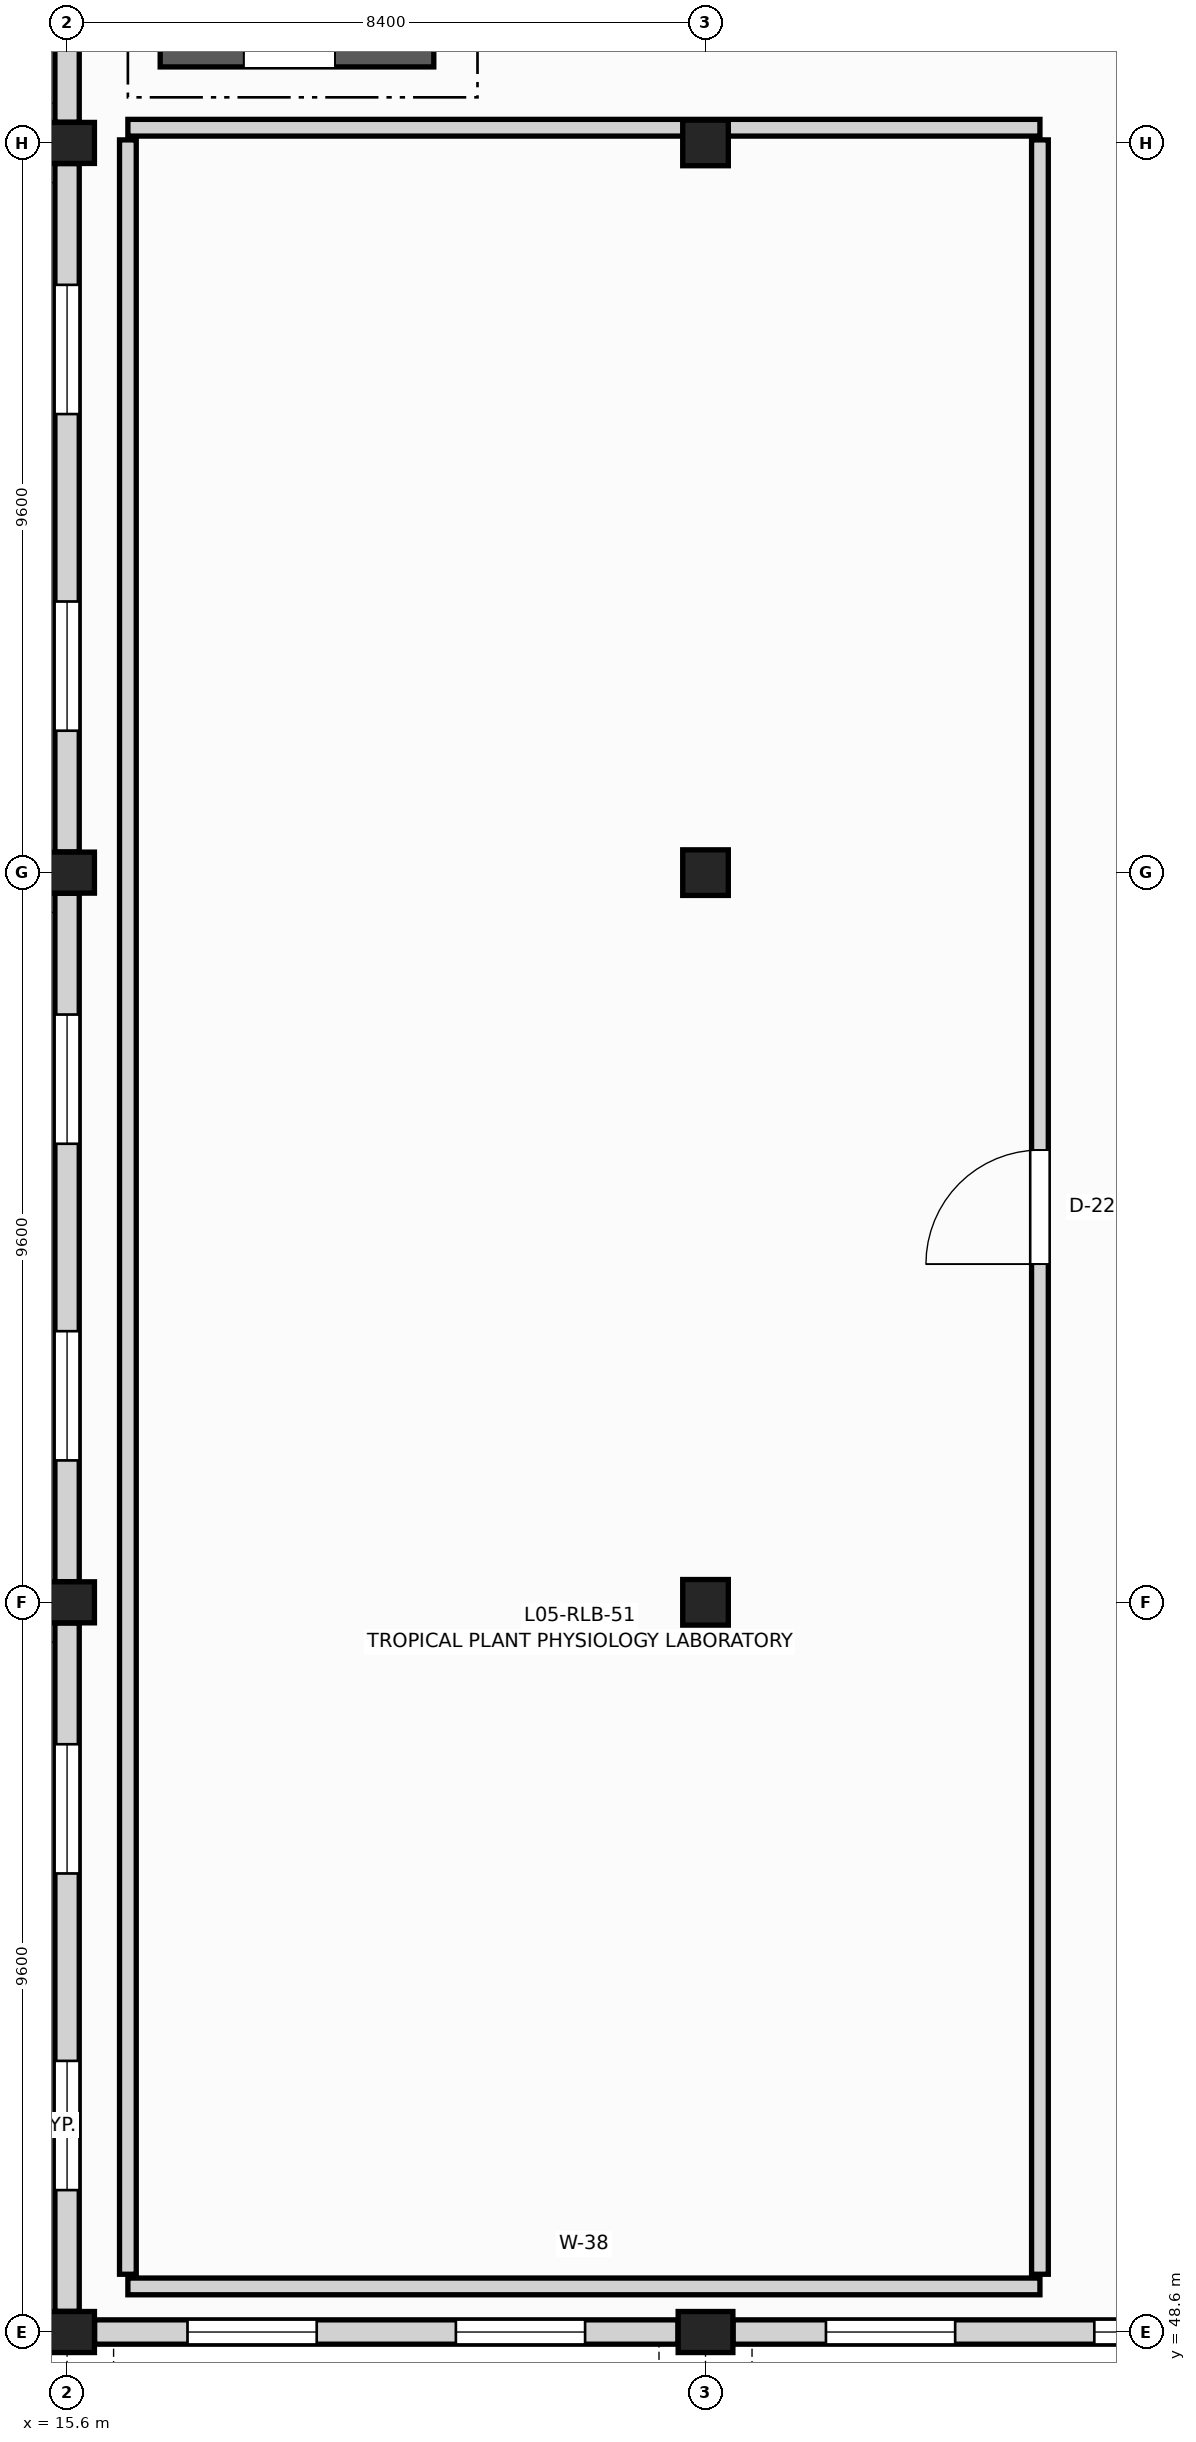
"""IFC4 building model, lengths in metres.
Left out: names, types, materials, properties, quantities, classifications, styles, units other than length and angle.
Written with IfcOpenShell. Run it as: python <this file> out.ifc"""

import sys

from ifc_helpers import new_model, si_unit, direction, frame, frame_2d, origin, origin_2d, place, context, subcontext, project, spatial, rectangle, extrude, element, fill, save


model = new_model("IFC4")
c1 = context("Model", 3, precision=1e-05, world=origin(), true_north=direction((0.0, 1.0)))
c2 = subcontext(c1, "Body", "Model", "MODEL_VIEW")
j1 = project(units=[si_unit("LENGTHUNIT", "METRE"), si_unit("PLANEANGLEUNIT", "RADIAN")], contexts=[c1])
p1 = place(None, origin())
s1 = spatial("IfcSite", under=j1, at=p1, CompositionType="ELEMENT")
p2 = place(p1, origin())
s2 = spatial("IfcBuilding", under=s1, at=p2, CompositionType="ELEMENT")
p3 = place(p2, frame((0.0, 0.0, 22.5)))
s3 = spatial("IfcBuildingStorey", under=s2, at=p3, CompositionType="ELEMENT", Elevation=22.5)
for number, where, z_axis, x_axis in (
    (1, (15.6, 48.6, 0.0), (0.0, 0.0, 1.0), (1.0, 0.0, 0.0)),
    (2, (15.6, 58.2, 0.0), (0.0, 0.0, 1.0), (1.0, 0.0, 0.0)),
    (3, (15.6, 67.8, 0.0), (0.0, 0.0, 1.0), (1.0, 0.0, 0.0)),
    (4, (15.6, 77.4, 0.0), (0.0, 0.0, 1.0), (1.0, 0.0, 0.0)),
    (5, (24.0, 48.6, 0.0), (0.0, 0.0, 1.0), (1.0, 0.0, 0.0)),
):
    element("IfcColumn", number, at=place(p3, frame(where, z_axis=z_axis, x_axis=x_axis)), inside=s3, PredefinedType="COLUMN", context=c2, shape_type="SweptSolid", body=[
        extrude(rectangle(XDim=0.72, YDim=0.54, at=origin_2d()), origin(), (0.0, 0.0, 1.0), 3.98),
    ])
for number, where, z_axis, x_axis in (
    (6, (24.0, 58.2, 0.0), (0.0, 0.0, 1.0), (1.0, 0.0, 0.0)),
    (7, (24.0, 67.8, 0.0), (0.0, 0.0, 1.0), (1.0, 0.0, 0.0)),
    (8, (24.0, 77.4, 0.0), (0.0, 0.0, 1.0), (1.0, 0.0, 0.0)),
):
    element("IfcColumn", number, at=place(p3, frame(where, z_axis=z_axis, x_axis=x_axis)), inside=s3, PredefinedType="COLUMN", context=c2, shape_type="SweptSolid", body=[
        extrude(rectangle(XDim=0.6, YDim=0.6, at=origin_2d()), origin(), (0.0, 0.0, 1.0), 3.98),
    ])
p4 = place(p3, frame((15.6, 48.872, 0.0), z_axis=(0.0, 0.0, 1.0), x_axis=(0.0, 1.0, 0.0)))
e9 = element("IfcWall", 9, at=p4, inside=s3, PredefinedType="SOLIDWALL", context=c2, shape_type="SweptSolid", body=[
    extrude(rectangle(XDim=9.056, YDim=0.32, at=frame_2d((4.528, 0.0))), origin(), (0.0, 0.0, 1.0), 3.08),
])
p5 = place(p4, frame((1.595, 0.0, 0.9)))
e10 = element("IfcOpeningElement", 10, at=p5, cuts=e9, PredefinedType="OPENING", context=c2, shape_type="SweptSolid", body=[
    extrude(rectangle(XDim=1.7, YDim=1.8, at=frame_2d((0.85, 0.9))), frame((0.0, 0.17, 0.0), z_axis=(0.0, -1.0, 0.0), x_axis=(1.0, 0.0, 0.0)), (0.0, 0.0, 1.0), 0.34),
])
p6 = place(p4, frame((5.761, 0.0, 0.9)))
e11 = element("IfcOpeningElement", 11, at=p6, cuts=e9, PredefinedType="OPENING", context=c2, shape_type="SweptSolid", body=[
    extrude(rectangle(XDim=1.7, YDim=1.8, at=frame_2d((0.85, 0.9))), frame((0.0, 0.17, 0.0), z_axis=(0.0, -1.0, 0.0), x_axis=(1.0, 0.0, 0.0)), (0.0, 0.0, 1.0), 0.34),
])
p7 = place(p3, frame((15.6, 58.472, 0.0), z_axis=(0.0, 0.0, 1.0), x_axis=(0.0, 1.0, 0.0)))
e12 = element("IfcWall", 12, at=p7, inside=s3, PredefinedType="SOLIDWALL", context=c2, shape_type="SweptSolid", body=[
    extrude(rectangle(XDim=9.056, YDim=0.32, at=frame_2d((4.528, 0.0))), origin(), (0.0, 0.0, 1.0), 3.08),
])
p8 = place(p7, frame((1.595, 0.0, 0.9)))
e13 = element("IfcOpeningElement", 13, at=p8, cuts=e12, PredefinedType="OPENING", context=c2, shape_type="SweptSolid", body=[
    extrude(rectangle(XDim=1.7, YDim=1.8, at=frame_2d((0.85, 0.9))), frame((0.0, 0.17, 0.0), z_axis=(0.0, -1.0, 0.0), x_axis=(1.0, 0.0, 0.0)), (0.0, 0.0, 1.0), 0.34),
])
p9 = place(p7, frame((5.761, 0.0, 0.9)))
e14 = element("IfcOpeningElement", 14, at=p9, cuts=e12, PredefinedType="OPENING", context=c2, shape_type="SweptSolid", body=[
    extrude(rectangle(XDim=1.7, YDim=1.8, at=frame_2d((0.85, 0.9))), frame((0.0, 0.17, 0.0), z_axis=(0.0, -1.0, 0.0), x_axis=(1.0, 0.0, 0.0)), (0.0, 0.0, 1.0), 0.34),
])
p10 = place(p3, frame((15.6, 68.072, 0.0), z_axis=(0.0, 0.0, 1.0), x_axis=(0.0, 1.0, 0.0)))
e15 = element("IfcWall", 15, at=p10, inside=s3, PredefinedType="SOLIDWALL", context=c2, shape_type="SweptSolid", body=[
    extrude(rectangle(XDim=9.056, YDim=0.32, at=frame_2d((4.528, 0.0))), origin(), (0.0, 0.0, 1.0), 3.08),
])
p11 = place(p10, frame((1.595, 0.0, 0.9)))
e16 = element("IfcOpeningElement", 16, at=p11, cuts=e15, PredefinedType="OPENING", context=c2, shape_type="SweptSolid", body=[
    extrude(rectangle(XDim=1.7, YDim=1.8, at=frame_2d((0.85, 0.9))), frame((0.0, 0.17, 0.0), z_axis=(0.0, -1.0, 0.0), x_axis=(1.0, 0.0, 0.0)), (0.0, 0.0, 1.0), 0.34),
])
p12 = place(p10, frame((5.761, 0.0, 0.9)))
e17 = element("IfcOpeningElement", 17, at=p12, cuts=e15, PredefinedType="OPENING", context=c2, shape_type="SweptSolid", body=[
    extrude(rectangle(XDim=1.7, YDim=1.8, at=frame_2d((0.85, 0.9))), frame((0.0, 0.17, 0.0), z_axis=(0.0, -1.0, 0.0), x_axis=(1.0, 0.0, 0.0)), (0.0, 0.0, 1.0), 0.34),
])
p13 = place(p3, frame((15.6, 77.672, 0.0), z_axis=(0.0, 0.0, 1.0), x_axis=(0.0, 1.0, 0.0)))
e18 = element("IfcWall", 18, at=p13, inside=s3, PredefinedType="SOLIDWALL", context=c2, shape_type="SweptSolid", body=[
    extrude(rectangle(XDim=8.976, YDim=0.32, at=frame_2d((4.488, 0.0))), origin(), (0.0, 0.0, 1.0), 3.08),
])
p14 = place(p13, frame((1.573, 0.0, 0.9)))
e19 = element("IfcOpeningElement", 19, at=p14, cuts=e18, PredefinedType="OPENING", context=c2, shape_type="SweptSolid", body=[
    extrude(rectangle(XDim=1.7, YDim=1.8, at=frame_2d((0.85, 0.9))), frame((0.0, 0.17, 0.0), z_axis=(0.0, -1.0, 0.0), x_axis=(1.0, 0.0, 0.0)), (0.0, 0.0, 1.0), 0.34),
])
p15 = place(p13, frame((5.702, 0.0, 0.9)))
e20 = element("IfcOpeningElement", 20, at=p15, cuts=e18, PredefinedType="OPENING", context=c2, shape_type="SweptSolid", body=[
    extrude(rectangle(XDim=1.7, YDim=1.8, at=frame_2d((0.85, 0.9))), frame((0.0, 0.17, 0.0), z_axis=(0.0, -1.0, 0.0), x_axis=(1.0, 0.0, 0.0)), (0.0, 0.0, 1.0), 0.34),
])
p16 = place(p3, frame((15.962, 48.6, 0.0), z_axis=(0.0, 0.0, 1.0), x_axis=(1.0, 0.0, 0.0)))
e21 = element("IfcWall", 21, at=p16, inside=s3, PredefinedType="SOLIDWALL", context=c2, shape_type="SweptSolid", body=[
    extrude(rectangle(XDim=7.676, YDim=0.32, at=frame_2d((3.838, 0.0))), origin(), (0.0, 0.0, 1.0), 3.08),
])
p17 = place(p16, frame((1.222, 0.0, 0.9)))
e22 = element("IfcOpeningElement", 22, at=p17, cuts=e21, PredefinedType="OPENING", context=c2, shape_type="SweptSolid", body=[
    extrude(rectangle(XDim=1.7, YDim=1.8, at=frame_2d((0.85, 0.9))), frame((0.0, 0.17, 0.0), z_axis=(0.0, -1.0, 0.0), x_axis=(1.0, 0.0, 0.0)), (0.0, 0.0, 1.0), 0.34),
])
p18 = place(p16, frame((4.753, 0.0, 0.9)))
e23 = element("IfcOpeningElement", 23, at=p18, cuts=e21, PredefinedType="OPENING", context=c2, shape_type="SweptSolid", body=[
    extrude(rectangle(XDim=1.7, YDim=1.8, at=frame_2d((0.85, 0.9))), frame((0.0, 0.17, 0.0), z_axis=(0.0, -1.0, 0.0), x_axis=(1.0, 0.0, 0.0)), (0.0, 0.0, 1.0), 0.34),
])
p19 = place(p3, frame((24.362, 48.6, 0.0), z_axis=(0.0, 0.0, 1.0), x_axis=(1.0, 0.0, 0.0)))
e24 = element("IfcWall", 24, at=p19, inside=s3, PredefinedType="SOLIDWALL", context=c2, shape_type="SweptSolid", body=[
    extrude(rectangle(XDim=7.676, YDim=0.32, at=frame_2d((3.838, 0.0))), origin(), (0.0, 0.0, 1.0), 3.08),
])
p20 = place(p19, frame((1.222, 0.0, 0.9)))
e25 = element("IfcOpeningElement", 25, at=p20, cuts=e24, PredefinedType="OPENING", context=c2, shape_type="SweptSolid", body=[
    extrude(rectangle(XDim=1.7, YDim=1.8, at=frame_2d((0.85, 0.9))), frame((0.0, 0.17, 0.0), z_axis=(0.0, -1.0, 0.0), x_axis=(1.0, 0.0, 0.0)), (0.0, 0.0, 1.0), 0.34),
])
p21 = place(p19, frame((4.753, 0.0, 0.9)))
e26 = element("IfcOpeningElement", 26, at=p21, cuts=e24, PredefinedType="OPENING", context=c2, shape_type="SweptSolid", body=[
    extrude(rectangle(XDim=1.7, YDim=1.8, at=frame_2d((0.85, 0.9))), frame((0.0, 0.17, 0.0), z_axis=(0.0, -1.0, 0.0), x_axis=(1.0, 0.0, 0.0)), (0.0, 0.0, 1.0), 0.34),
])
p22 = place(p3, frame((16.825, 78.575, 0.0), z_axis=(0.0, 0.0, 1.0), x_axis=(1.0, 0.0, 0.0)))
e27 = element("IfcWall", 27, at=p22, inside=s3, PredefinedType="SHEAR", context=c2, shape_type="SweptSolid", body=[
    extrude(rectangle(XDim=3.6, YDim=0.35, at=frame_2d((1.8, 0.0))), origin(), (0.0, 0.0, 1.0), 3.92),
])
p23 = place(p22, frame((1.1, 0.0, 0.0)))
e28 = element("IfcOpeningElement", 28, at=p23, cuts=e27, PredefinedType="OPENING", context=c2, shape_type="SweptSolid", body=[
    extrude(rectangle(XDim=1.2, YDim=2.2, at=frame_2d((0.6, 1.1))), frame((0.0, 0.185, 0.0), z_axis=(0.0, -1.0, 0.0), x_axis=(1.0, 0.0, 0.0)), (0.0, 0.0, 1.0), 0.37),
])
for number, where, z_axis, x_axis in (
    (29, (16.4, 49.2, 0.0), (0.0, 0.0, 1.0), (1.0, 0.0, 0.0)),
    (30, (16.4, 77.6, 0.0), (0.0, 0.0, 1.0), (1.0, 0.0, 0.0)),
):
    element("IfcWall", number, at=place(p3, frame(where, z_axis=z_axis, x_axis=x_axis)), inside=s3, PredefinedType="PARTITIONING", context=c2, shape_type="SweptSolid", body=[
        extrude(rectangle(XDim=12.0, YDim=0.22, at=frame_2d((6.0, 0.0))), origin(), (0.0, 0.0, 1.0), 3.15),
    ])
p24 = place(p3, frame((16.4, 49.36, 0.0), z_axis=(0.0, 0.0, 1.0), x_axis=(0.0, 1.0, 0.0)))
e31 = element("IfcWall", 31, at=p24, inside=s3, PredefinedType="PARTITIONING", context=c2, shape_type="SweptSolid", body=[
    extrude(rectangle(XDim=28.08, YDim=0.22, at=frame_2d((14.04, 0.0))), origin(), (0.0, 0.0, 1.0), 3.15),
])
p25 = place(p3, frame((28.4, 49.36, 0.0), z_axis=(0.0, 0.0, 1.0), x_axis=(0.0, 1.0, 0.0)))
e32 = element("IfcWall", 32, at=p25, inside=s3, PredefinedType="PARTITIONING", context=c2, shape_type="SweptSolid", body=[
    extrude(rectangle(XDim=28.08, YDim=0.22, at=frame_2d((14.04, 0.0))), origin(), (0.0, 0.0, 1.0), 3.15),
])
p26 = place(p25, frame((13.29, 0.0, 0.0)))
e33 = element("IfcOpeningElement", 33, at=p26, cuts=e32, PredefinedType="OPENING", context=c2, shape_type="SweptSolid", body=[
    extrude(rectangle(XDim=1.5, YDim=2.2, at=frame_2d((0.75, 1.1))), frame((0.0, 0.12, 0.0), z_axis=(0.0, -1.0, 0.0), x_axis=(1.0, 0.0, 0.0)), (0.0, 0.0, 1.0), 0.24),
])
p27 = place(p5, origin())
e34 = element("IfcWindow", 34, at=p27, inside=s3, PartitioningType="SINGLE_PANEL", PredefinedType="WINDOW", context=c2, shape_type="SweptSolid", body=[
    extrude(rectangle(XDim=1.7, YDim=1.8, at=frame_2d((0.85, 0.9))), frame((0.0, 0.03, 0.0), z_axis=(0.0, -1.0, 0.0), x_axis=(1.0, 0.0, 0.0)), (0.0, 0.0, 1.0), 0.06),
])
fill(e10, e34)
p28 = place(p6, origin())
e35 = element("IfcWindow", 35, at=p28, inside=s3, PartitioningType="SINGLE_PANEL", PredefinedType="WINDOW", context=c2, shape_type="SweptSolid", body=[
    extrude(rectangle(XDim=1.7, YDim=1.8, at=frame_2d((0.85, 0.9))), frame((0.0, 0.03, 0.0), z_axis=(0.0, -1.0, 0.0), x_axis=(1.0, 0.0, 0.0)), (0.0, 0.0, 1.0), 0.06),
])
fill(e11, e35)
p29 = place(p8, origin())
e36 = element("IfcWindow", 36, at=p29, inside=s3, PartitioningType="SINGLE_PANEL", PredefinedType="WINDOW", context=c2, shape_type="SweptSolid", body=[
    extrude(rectangle(XDim=1.7, YDim=1.8, at=frame_2d((0.85, 0.9))), frame((0.0, 0.03, 0.0), z_axis=(0.0, -1.0, 0.0), x_axis=(1.0, 0.0, 0.0)), (0.0, 0.0, 1.0), 0.06),
])
fill(e13, e36)
p30 = place(p9, origin())
e37 = element("IfcWindow", 37, at=p30, inside=s3, PartitioningType="SINGLE_PANEL", PredefinedType="WINDOW", context=c2, shape_type="SweptSolid", body=[
    extrude(rectangle(XDim=1.7, YDim=1.8, at=frame_2d((0.85, 0.9))), frame((0.0, 0.03, 0.0), z_axis=(0.0, -1.0, 0.0), x_axis=(1.0, 0.0, 0.0)), (0.0, 0.0, 1.0), 0.06),
])
fill(e14, e37)
p31 = place(p11, origin())
e38 = element("IfcWindow", 38, at=p31, inside=s3, PartitioningType="SINGLE_PANEL", PredefinedType="WINDOW", context=c2, shape_type="SweptSolid", body=[
    extrude(rectangle(XDim=1.7, YDim=1.8, at=frame_2d((0.85, 0.9))), frame((0.0, 0.03, 0.0), z_axis=(0.0, -1.0, 0.0), x_axis=(1.0, 0.0, 0.0)), (0.0, 0.0, 1.0), 0.06),
])
fill(e16, e38)
p32 = place(p12, origin())
e39 = element("IfcWindow", 39, at=p32, inside=s3, PartitioningType="SINGLE_PANEL", PredefinedType="WINDOW", context=c2, shape_type="SweptSolid", body=[
    extrude(rectangle(XDim=1.7, YDim=1.8, at=frame_2d((0.85, 0.9))), frame((0.0, 0.03, 0.0), z_axis=(0.0, -1.0, 0.0), x_axis=(1.0, 0.0, 0.0)), (0.0, 0.0, 1.0), 0.06),
])
fill(e17, e39)
p33 = place(p17, origin())
e40 = element("IfcWindow", 40, at=p33, inside=s3, PartitioningType="SINGLE_PANEL", PredefinedType="WINDOW", context=c2, shape_type="SweptSolid", body=[
    extrude(rectangle(XDim=1.7, YDim=1.8, at=frame_2d((0.85, 0.9))), frame((0.0, 0.03, 0.0), z_axis=(0.0, -1.0, 0.0), x_axis=(1.0, 0.0, 0.0)), (0.0, 0.0, 1.0), 0.06),
])
fill(e22, e40)
p34 = place(p18, origin())
e41 = element("IfcWindow", 41, at=p34, inside=s3, PartitioningType="SINGLE_PANEL", PredefinedType="WINDOW", context=c2, shape_type="SweptSolid", body=[
    extrude(rectangle(XDim=1.7, YDim=1.8, at=frame_2d((0.85, 0.9))), frame((0.0, 0.03, 0.0), z_axis=(0.0, -1.0, 0.0), x_axis=(1.0, 0.0, 0.0)), (0.0, 0.0, 1.0), 0.06),
])
fill(e23, e41)
p35 = place(p20, origin())
e42 = element("IfcWindow", 42, at=p35, inside=s3, PartitioningType="SINGLE_PANEL", PredefinedType="WINDOW", context=c2, shape_type="SweptSolid", body=[
    extrude(rectangle(XDim=1.7, YDim=1.8, at=frame_2d((0.85, 0.9))), frame((0.0, 0.03, 0.0), z_axis=(0.0, -1.0, 0.0), x_axis=(1.0, 0.0, 0.0)), (0.0, 0.0, 1.0), 0.06),
])
fill(e25, e42)
p36 = place(p21, origin())
e43 = element("IfcWindow", 43, at=p36, inside=s3, PartitioningType="SINGLE_PANEL", PredefinedType="WINDOW", context=c2, shape_type="SweptSolid", body=[
    extrude(rectangle(XDim=1.7, YDim=1.8, at=frame_2d((0.85, 0.9))), frame((0.0, 0.03, 0.0), z_axis=(0.0, -1.0, 0.0), x_axis=(1.0, 0.0, 0.0)), (0.0, 0.0, 1.0), 0.06),
])
fill(e26, e43)
p37 = place(p23, origin())
e44 = element("IfcDoor", 44, at=p37, inside=s3, OperationType="SINGLE_SWING_RIGHT", PredefinedType="DOOR", context=c2, shape_type="SweptSolid", body=[
    extrude(rectangle(XDim=1.2, YDim=2.2, at=frame_2d((0.6, 1.1))), frame((0.0, 0.025, 0.0), z_axis=(0.0, -1.0, 0.0), x_axis=(1.0, 0.0, 0.0)), (0.0, 0.0, 1.0), 0.05),
])
fill(e28, e44)
p38 = place(p26, origin())
e45 = element("IfcDoor", 45, at=p38, inside=s3, OperationType="SINGLE_SWING_LEFT", PredefinedType="DOOR", context=c2, shape_type="SweptSolid", body=[
    extrude(rectangle(XDim=1.5, YDim=2.2, at=frame_2d((0.75, 1.1))), frame((0.0, 0.025, 0.0), z_axis=(0.0, -1.0, 0.0), x_axis=(1.0, 0.0, 0.0)), (0.0, 0.0, 1.0), 0.05),
])
fill(e33, e45)
save(model, sys.argv[1])
